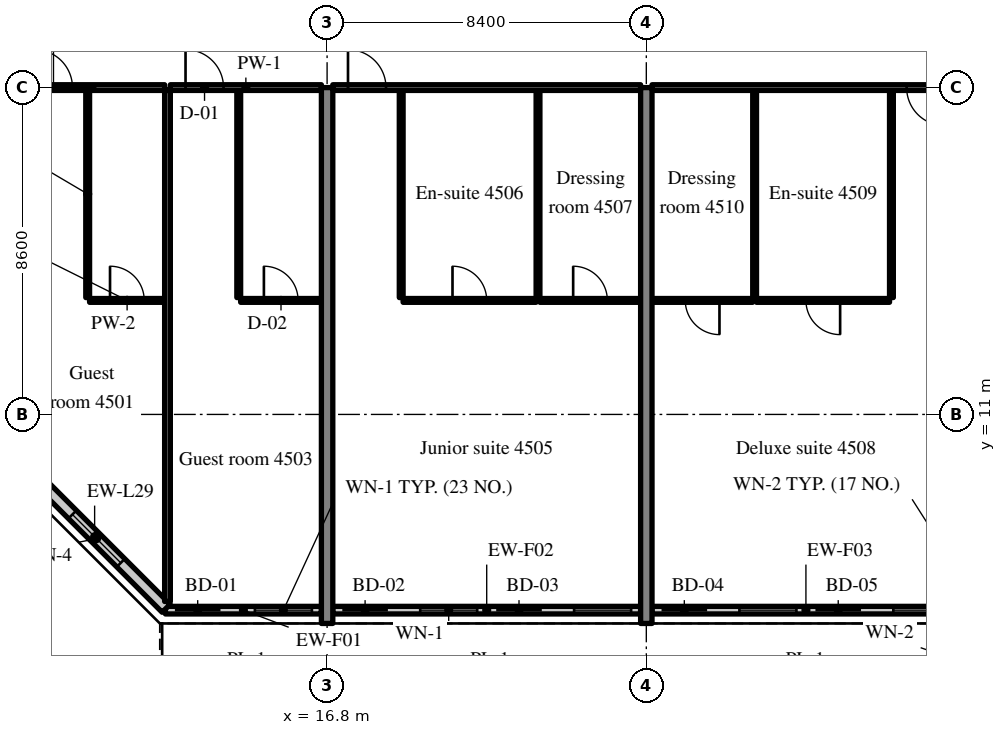
"""IFC4 building model, lengths in metres.
Left out: names, types, materials, properties, quantities, classifications, styles, units other than length and angle.
Written with IfcOpenShell. Run it as: python <this file> out.ifc"""

import sys

from ifc_helpers import new_model, si_unit, direction, frame, frame_2d, origin, place, context, subcontext, project, spatial, rectangle, extrude, source, transform, mapped, element, fill, save


model = new_model("IFC4")
c1 = context("Model", 3, precision=1e-05, world=origin(), true_north=direction((0.0, 1.0)))
c2 = subcontext(c1, "Body", "Model", "MODEL_VIEW")
j1 = project(units=[si_unit("LENGTHUNIT", "METRE"), si_unit("PLANEANGLEUNIT", "RADIAN")], contexts=[c1])
p1 = place(None, origin())
s1 = spatial("IfcSite", under=j1, at=p1, CompositionType="ELEMENT")
p2 = place(p1, origin())
s2 = spatial("IfcBuilding", under=s1, at=p2, CompositionType="ELEMENT")
p3 = place(p2, frame((0.0, 0.0, 185.8)))
s3 = spatial("IfcBuildingStorey", under=s2, at=p3, CompositionType="ELEMENT", Elevation=185.8)
m1 = source(origin(), c2, "Body", "SweptSolid", [
    extrude(rectangle(XDim=14.1, YDim=0.3, at=frame_2d((7.05, 0.0))), origin(), (0.0, 0.0, 1.0), 3.52),
])
for number, where, z_axis, x_axis in (
    (1, (16.8, 5.5, 0.0), (0.0, 0.0, 1.0), (0.0, 1.0, 0.0)),
    (2, (25.2, 5.5, 0.0), (0.0, 0.0, 1.0), (0.0, 1.0, 0.0)),
):
    element("IfcWall", number, at=place(p3, frame(where, z_axis=z_axis, x_axis=x_axis)), inside=s3, PredefinedType="SHEAR", context=c2, shape_type="MappedRepresentation", body=[
        mapped(m1, transform((0.0, 0.0, 0.0), scale=1.0)),
    ])
m2 = source(origin(), c2, "Body", "SweptSolid", [
    extrude(rectangle(XDim=4.105, YDim=0.2, at=frame_2d((2.052, 0.0))), origin(), (0.0, 0.0, 1.0), 2.87),
])
p4 = place(p3, frame((12.545, 5.85, 0.0), z_axis=(0.0, 0.0, 1.0), x_axis=(1.0, 0.0, 0.0)))
e3 = element("IfcWall", 3, at=p4, inside=s3, PredefinedType="SOLIDWALL", context=c2, shape_type="MappedRepresentation", body=[
    mapped(m2, transform((0.0, 0.0, 0.0), scale=1.0)),
])
m3 = source(origin(), c2, "Body", "SweptSolid", [
    extrude(rectangle(XDim=1.2, YDim=2.4, at=frame_2d((0.6, 1.2))), frame((0.0, 0.11, 0.0), z_axis=(0.0, -1.0, 0.0), x_axis=(1.0, 0.0, 0.0)), (0.0, 0.0, 1.0), 0.22),
])
p5 = place(p4, frame((0.25, 0.0, 0.0)))
e4 = element("IfcOpeningElement", 4, at=p5, cuts=e3, PredefinedType="OPENING", context=c2, shape_type="MappedRepresentation", body=[
    mapped(m3, transform((0.0, 0.0, 0.0), scale=1.0)),
])
m4 = source(origin(), c2, "Body", "SweptSolid", [
    extrude(rectangle(XDim=1.5, YDim=1.5, at=frame_2d((0.75, 0.75))), frame((0.0, 0.11, 0.0), z_axis=(0.0, -1.0, 0.0), x_axis=(1.0, 0.0, 0.0)), (0.0, 0.0, 1.0), 0.22),
])
p6 = place(p4, frame((2.355, 0.0, 0.9)))
e5 = element("IfcOpeningElement", 5, at=p6, cuts=e3, PredefinedType="OPENING", context=c2, shape_type="MappedRepresentation", body=[
    mapped(m4, transform((0.0, 0.0, 0.0), scale=1.0)),
])
m5 = source(origin(), c2, "Body", "SweptSolid", [
    extrude(rectangle(XDim=8.1, YDim=0.2, at=frame_2d((4.05, 0.0))), origin(), (0.0, 0.0, 1.0), 2.87),
])
p7 = place(p3, frame((16.95, 5.85, 0.0), z_axis=(0.0, 0.0, 1.0), x_axis=(1.0, 0.0, 0.0)))
e6 = element("IfcWall", 6, at=p7, inside=s3, PredefinedType="SOLIDWALL", context=c2, shape_type="MappedRepresentation", body=[
    mapped(m5, transform((0.0, 0.0, 0.0), scale=1.0)),
])
p8 = place(p7, frame((0.25, 0.0, 0.0)))
e7 = element("IfcOpeningElement", 7, at=p8, cuts=e6, PredefinedType="OPENING", context=c2, shape_type="MappedRepresentation", body=[
    mapped(m3, transform((0.0, 0.0, 0.0), scale=1.0)),
])
p9 = place(p7, frame((2.3, 0.0, 0.9)))
e8 = element("IfcOpeningElement", 8, at=p9, cuts=e6, PredefinedType="OPENING", context=c2, shape_type="MappedRepresentation", body=[
    mapped(m4, transform((0.0, 0.0, 0.0), scale=1.0)),
])
p10 = place(p7, frame((4.3, 0.0, 0.0)))
e9 = element("IfcOpeningElement", 9, at=p10, cuts=e6, PredefinedType="OPENING", context=c2, shape_type="MappedRepresentation", body=[
    mapped(m3, transform((0.0, 0.0, 0.0), scale=1.0)),
])
p11 = place(p7, frame((6.35, 0.0, 0.9)))
e10 = element("IfcOpeningElement", 10, at=p11, cuts=e6, PredefinedType="OPENING", context=c2, shape_type="MappedRepresentation", body=[
    mapped(m4, transform((0.0, 0.0, 0.0), scale=1.0)),
])
m6 = source(origin(), c2, "Body", "SweptSolid", [
    extrude(rectangle(XDim=8.1, YDim=0.2, at=frame_2d((4.05, 0.0))), origin(), (0.0, 0.0, 1.0), 2.87),
])
p12 = place(p3, frame((25.35, 5.85, 0.0), z_axis=(0.0, 0.0, 1.0), x_axis=(1.0, 0.0, 0.0)))
e11 = element("IfcWall", 11, at=p12, inside=s3, PredefinedType="SOLIDWALL", context=c2, shape_type="MappedRepresentation", body=[
    mapped(m6, transform((0.0, 0.0, 0.0), scale=1.0)),
])
p13 = place(p12, frame((0.25, 0.0, 0.0)))
e12 = element("IfcOpeningElement", 12, at=p13, cuts=e11, PredefinedType="OPENING", context=c2, shape_type="MappedRepresentation", body=[
    mapped(m3, transform((0.0, 0.0, 0.0), scale=1.0)),
])
p14 = place(p12, frame((2.3, 0.0, 0.9)))
e13 = element("IfcOpeningElement", 13, at=p14, cuts=e11, PredefinedType="OPENING", context=c2, shape_type="MappedRepresentation", body=[
    mapped(m4, transform((0.0, 0.0, 0.0), scale=1.0)),
])
p15 = place(p12, frame((4.3, 0.0, 0.0)))
e14 = element("IfcOpeningElement", 14, at=p15, cuts=e11, PredefinedType="OPENING", context=c2, shape_type="MappedRepresentation", body=[
    mapped(m3, transform((0.0, 0.0, 0.0), scale=1.0)),
])
p16 = place(p12, frame((6.35, 0.0, 0.9)))
e15 = element("IfcOpeningElement", 15, at=p16, cuts=e11, PredefinedType="OPENING", context=c2, shape_type="MappedRepresentation", body=[
    mapped(m4, transform((0.0, 0.0, 0.0), scale=1.0)),
])
m7 = source(origin(), c2, "Body", "SweptSolid", [
    extrude(rectangle(XDim=5.326, YDim=0.3, at=frame_2d((2.663, 0.0))), origin(), (0.0, 0.0, 1.0), 3.52),
])
p17 = place(p3, frame((8.8, 9.666, 0.0), z_axis=(0.0, 0.0, 1.0), x_axis=(0.707083859269, -0.707129702361, 0.0)))
e16 = element("IfcWall", 16, at=p17, inside=s3, PredefinedType="SOLIDWALL", context=c2, shape_type="MappedRepresentation", body=[
    mapped(m7, transform((0.0, 0.0, 0.0), scale=1.0)),
])
m8 = source(origin(), c2, "Body", "SweptSolid", [
    extrude(rectangle(XDim=1.8, YDim=1.5, at=frame_2d((0.9, 0.75))), frame((0.0, 0.16, 0.0), z_axis=(0.0, -1.0, 0.0), x_axis=(1.0, 0.0, 0.0)), (0.0, 0.0, 1.0), 0.32),
])
p18 = place(p17, frame((1.836, 0.0, 0.9)))
e17 = element("IfcOpeningElement", 17, at=p18, cuts=e16, PredefinedType="OPENING", context=c2, shape_type="MappedRepresentation", body=[
    mapped(m8, transform((0.0, 0.0, 0.0), scale=1.0)),
])
m9 = source(origin(), c2, "Body", "SweptSolid", [
    extrude(rectangle(XDim=5.45, YDim=0.1, at=frame_2d((2.725, 0.0))), origin(), (0.0, 0.0, 1.0), 3.52),
])
p19 = place(p3, frame((10.5, 14.075, 0.0), z_axis=(0.0, 0.0, 1.0), x_axis=(0.0, 1.0, 0.0)))
e18 = element("IfcWall", 18, at=p19, inside=s3, PredefinedType="PARTITIONING", context=c2, shape_type="MappedRepresentation", body=[
    mapped(m9, transform((0.0, 0.0, 0.0), scale=1.0)),
])
m10 = source(origin(), c2, "Body", "SweptSolid", [
    extrude(rectangle(XDim=1.975, YDim=0.1, at=frame_2d((0.987, 0.0))), origin(), (0.0, 0.0, 1.0), 3.52),
])
p20 = place(p3, frame((10.55, 14.0, 0.0), z_axis=(0.0, 0.0, 1.0), x_axis=(1.0, 0.0, 0.0)))
e19 = element("IfcWall", 19, at=p20, inside=s3, PredefinedType="PARTITIONING", context=c2, shape_type="MappedRepresentation", body=[
    mapped(m10, transform((0.0, 0.0, 0.0), scale=1.0)),
])
m11 = source(origin(), c2, "Body", "SweptSolid", [
    extrude(rectangle(XDim=0.9, YDim=2.1, at=frame_2d((0.45, 1.05))), frame((0.0, 0.06, 0.0), z_axis=(0.0, -1.0, 0.0), x_axis=(1.0, 0.0, 0.0)), (0.0, 0.0, 1.0), 0.12),
])
p21 = place(p20, frame((0.538, 0.0, 0.0)))
e20 = element("IfcOpeningElement", 20, at=p21, cuts=e19, PredefinedType="OPENING", context=c2, shape_type="MappedRepresentation", body=[
    mapped(m11, transform((0.0, 0.0, 0.0), scale=1.0)),
])
m12 = source(origin(), c2, "Body", "SweptSolid", [
    extrude(rectangle(XDim=3.825, YDim=0.15, at=frame_2d((1.913, 0.0))), origin(), (0.0, 0.0, 1.0), 2.82),
])
p22 = place(p3, frame((8.7, 19.6, 0.0), z_axis=(0.0, 0.0, 1.0), x_axis=(1.0, 0.0, 0.0)))
e21 = element("IfcWall", 21, at=p22, inside=s3, PredefinedType="PARTITIONING", context=c2, shape_type="MappedRepresentation", body=[
    mapped(m12, transform((0.0, 0.0, 0.0), scale=1.0)),
])
m13 = source(origin(), c2, "Body", "SweptSolid", [
    extrude(rectangle(XDim=1.0, YDim=2.1, at=frame_2d((0.5, 1.05))), frame((0.0, 0.085, 0.0), z_axis=(0.0, -1.0, 0.0), x_axis=(1.0, 0.0, 0.0)), (0.0, 0.0, 1.0), 0.17),
])
p23 = place(p22, frame((0.4, 0.0, 0.0)))
e22 = element("IfcOpeningElement", 22, at=p23, cuts=e21, PredefinedType="OPENING", context=c2, shape_type="MappedRepresentation", body=[
    mapped(m13, transform((0.0, 0.0, 0.0), scale=1.0)),
])
p24 = place(p3, frame((14.475, 14.075, 0.0), z_axis=(0.0, 0.0, 1.0), x_axis=(0.0, 1.0, 0.0)))
e23 = element("IfcWall", 23, at=p24, inside=s3, PredefinedType="PARTITIONING", context=c2, shape_type="MappedRepresentation", body=[
    mapped(m9, transform((0.0, 0.0, 0.0), scale=1.0)),
])
m14 = source(origin(), c2, "Body", "SweptSolid", [
    extrude(rectangle(XDim=2.125, YDim=0.1, at=frame_2d((1.062, 0.0))), origin(), (0.0, 0.0, 1.0), 3.52),
])
p25 = place(p3, frame((14.525, 14.0, 0.0), z_axis=(0.0, 0.0, 1.0), x_axis=(1.0, 0.0, 0.0)))
e24 = element("IfcWall", 24, at=p25, inside=s3, PredefinedType="PARTITIONING", context=c2, shape_type="MappedRepresentation", body=[
    mapped(m14, transform((0.0, 0.0, 0.0), scale=1.0)),
])
p26 = place(p25, frame((0.612, 0.0, 0.0)))
e25 = element("IfcOpeningElement", 25, at=p26, cuts=e24, PredefinedType="OPENING", context=c2, shape_type="MappedRepresentation", body=[
    mapped(m11, transform((0.0, 0.0, 0.0), scale=1.0)),
])
m15 = source(origin(), c2, "Body", "SweptSolid", [
    extrude(rectangle(XDim=3.975, YDim=0.15, at=frame_2d((1.987, 0.0))), origin(), (0.0, 0.0, 1.0), 2.82),
])
p27 = place(p3, frame((12.675, 19.6, 0.0), z_axis=(0.0, 0.0, 1.0), x_axis=(1.0, 0.0, 0.0)))
e26 = element("IfcWall", 26, at=p27, inside=s3, PredefinedType="PARTITIONING", context=c2, shape_type="MappedRepresentation", body=[
    mapped(m15, transform((0.0, 0.0, 0.0), scale=1.0)),
])
p28 = place(p27, frame((0.4, 0.0, 0.0)))
e27 = element("IfcOpeningElement", 27, at=p28, cuts=e26, PredefinedType="OPENING", context=c2, shape_type="MappedRepresentation", body=[
    mapped(m13, transform((0.0, 0.0, 0.0), scale=1.0)),
])
m16 = source(origin(), c2, "Body", "SweptSolid", [
    extrude(rectangle(XDim=13.447, YDim=0.15, at=frame_2d((6.724, 0.0))), origin(), (0.0, 0.0, 1.0), 3.52),
])
p29 = place(p3, frame((12.6, 6.078, 0.0), z_axis=(0.0, 0.0, 1.0), x_axis=(0.0, 1.0, 0.0)))
e28 = element("IfcWall", 28, at=p29, inside=s3, PredefinedType="PARTITIONING", context=c2, shape_type="MappedRepresentation", body=[
    mapped(m16, transform((0.0, 0.0, 0.0), scale=1.0)),
])
for number, where, z_axis, x_axis in (
    (29, (18.75, 14.075, 0.0), (0.0, 0.0, 1.0), (0.0, 1.0, 0.0)),
    (30, (22.35, 14.075, 0.0), (0.0, 0.0, 1.0), (0.0, 1.0, 0.0)),
):
    element("IfcWall", number, at=place(p3, frame(where, z_axis=z_axis, x_axis=x_axis)), inside=s3, PredefinedType="PARTITIONING", context=c2, shape_type="MappedRepresentation", body=[
        mapped(m9, transform((0.0, 0.0, 0.0), scale=1.0)),
    ])
m17 = source(origin(), c2, "Body", "SweptSolid", [
    extrude(rectangle(XDim=3.5, YDim=0.1, at=frame_2d((1.75, 0.0))), origin(), (0.0, 0.0, 1.0), 3.52),
])
p30 = place(p3, frame((18.8, 14.0, 0.0), z_axis=(0.0, 0.0, 1.0), x_axis=(1.0, 0.0, 0.0)))
e31 = element("IfcWall", 31, at=p30, inside=s3, PredefinedType="PARTITIONING", context=c2, shape_type="MappedRepresentation", body=[
    mapped(m17, transform((0.0, 0.0, 0.0), scale=1.0)),
])
p31 = place(p30, frame((1.3, 0.0, 0.0)))
e32 = element("IfcOpeningElement", 32, at=p31, cuts=e31, PredefinedType="OPENING", context=c2, shape_type="MappedRepresentation", body=[
    mapped(m11, transform((0.0, 0.0, 0.0), scale=1.0)),
])
m18 = source(origin(), c2, "Body", "SweptSolid", [
    extrude(rectangle(XDim=2.65, YDim=0.1, at=frame_2d((1.325, 0.0))), origin(), (0.0, 0.0, 1.0), 3.52),
])
p32 = place(p3, frame((22.4, 14.0, 0.0), z_axis=(0.0, 0.0, 1.0), x_axis=(1.0, 0.0, 0.0)))
e33 = element("IfcWall", 33, at=p32, inside=s3, PredefinedType="PARTITIONING", context=c2, shape_type="MappedRepresentation", body=[
    mapped(m18, transform((0.0, 0.0, 0.0), scale=1.0)),
])
p33 = place(p32, frame((0.875, 0.0, 0.0)))
e34 = element("IfcOpeningElement", 34, at=p33, cuts=e33, PredefinedType="OPENING", context=c2, shape_type="MappedRepresentation", body=[
    mapped(m11, transform((0.0, 0.0, 0.0), scale=1.0)),
])
m19 = source(origin(), c2, "Body", "SweptSolid", [
    extrude(rectangle(XDim=8.1, YDim=0.15, at=frame_2d((4.05, 0.0))), origin(), (0.0, 0.0, 1.0), 2.82),
])
p34 = place(p3, frame((16.95, 19.6, 0.0), z_axis=(0.0, 0.0, 1.0), x_axis=(1.0, 0.0, 0.0)))
e35 = element("IfcWall", 35, at=p34, inside=s3, PredefinedType="PARTITIONING", context=c2, shape_type="MappedRepresentation", body=[
    mapped(m19, transform((0.0, 0.0, 0.0), scale=1.0)),
])
p35 = place(p34, frame((0.4, 0.0, 0.0)))
e36 = element("IfcOpeningElement", 36, at=p35, cuts=e35, PredefinedType="OPENING", context=c2, shape_type="MappedRepresentation", body=[
    mapped(m13, transform((0.0, 0.0, 0.0), scale=1.0)),
])
for number, where, z_axis, x_axis in (
    (37, (31.65, 14.075, 0.0), (0.0, 0.0, 1.0), (0.0, 1.0, 0.0)),
    (38, (28.05, 14.075, 0.0), (0.0, 0.0, 1.0), (0.0, 1.0, 0.0)),
):
    element("IfcWall", number, at=place(p3, frame(where, z_axis=z_axis, x_axis=x_axis)), inside=s3, PredefinedType="PARTITIONING", context=c2, shape_type="MappedRepresentation", body=[
        mapped(m9, transform((0.0, 0.0, 0.0), scale=1.0)),
    ])
p36 = place(p3, frame((28.1, 14.0, 0.0), z_axis=(0.0, 0.0, 1.0), x_axis=(1.0, 0.0, 0.0)))
e39 = element("IfcWall", 39, at=p36, inside=s3, PredefinedType="PARTITIONING", context=c2, shape_type="MappedRepresentation", body=[
    mapped(m17, transform((0.0, 0.0, 0.0), scale=1.0)),
])
p37 = place(p36, frame((1.3, 0.0, 0.0)))
e40 = element("IfcOpeningElement", 40, at=p37, cuts=e39, PredefinedType="OPENING", context=c2, shape_type="MappedRepresentation", body=[
    mapped(m11, transform((0.0, 0.0, 0.0), scale=1.0)),
])
m20 = source(origin(), c2, "Body", "SweptSolid", [
    extrude(rectangle(XDim=2.65, YDim=0.1, at=frame_2d((1.325, 0.0))), origin(), (0.0, 0.0, 1.0), 3.52),
])
p38 = place(p3, frame((25.35, 14.0, 0.0), z_axis=(0.0, 0.0, 1.0), x_axis=(1.0, 0.0, 0.0)))
e41 = element("IfcWall", 41, at=p38, inside=s3, PredefinedType="PARTITIONING", context=c2, shape_type="MappedRepresentation", body=[
    mapped(m20, transform((0.0, 0.0, 0.0), scale=1.0)),
])
p39 = place(p38, frame((0.875, 0.0, 0.0)))
e42 = element("IfcOpeningElement", 42, at=p39, cuts=e41, PredefinedType="OPENING", context=c2, shape_type="MappedRepresentation", body=[
    mapped(m11, transform((0.0, 0.0, 0.0), scale=1.0)),
])
m21 = source(origin(), c2, "Body", "SweptSolid", [
    extrude(rectangle(XDim=8.1, YDim=0.15, at=frame_2d((4.05, 0.0))), origin(), (0.0, 0.0, 1.0), 2.82),
])
p40 = place(p3, frame((25.35, 19.6, 0.0), z_axis=(0.0, 0.0, 1.0), x_axis=(1.0, 0.0, 0.0)))
e43 = element("IfcWall", 43, at=p40, inside=s3, PredefinedType="PARTITIONING", context=c2, shape_type="MappedRepresentation", body=[
    mapped(m21, transform((0.0, 0.0, 0.0), scale=1.0)),
])
p41 = place(p40, frame((6.7, 0.0, 0.0)))
e44 = element("IfcOpeningElement", 44, at=p41, cuts=e43, PredefinedType="OPENING", context=c2, shape_type="MappedRepresentation", body=[
    mapped(m13, transform((0.0, 0.0, 0.0), scale=1.0)),
])
m22 = source(origin(), c2, "Body", "SweptSolid", [
    extrude(rectangle(XDim=1.2, YDim=2.4, at=frame_2d((0.6, 1.2))), frame((0.0, 0.025, 0.0), z_axis=(0.0, -1.0, 0.0), x_axis=(1.0, 0.0, 0.0)), (0.0, 0.0, 1.0), 0.05),
])
p42 = place(p5, origin())
e45 = element("IfcDoor", 45, at=p42, inside=s3, OperationType="SLIDING_TO_LEFT", PredefinedType="DOOR", context=c2, shape_type="MappedRepresentation", body=[
    mapped(m22, transform((0.0, 0.0, 0.0), scale=1.0)),
])
fill(e4, e45)
m23 = source(origin(), c2, "Body", "SweptSolid", [
    extrude(rectangle(XDim=1.5, YDim=1.5, at=frame_2d((0.75, 0.75))), frame((0.0, 0.03, 0.0), z_axis=(0.0, -1.0, 0.0), x_axis=(1.0, 0.0, 0.0)), (0.0, 0.0, 1.0), 0.06),
])
p43 = place(p6, origin())
e46 = element("IfcWindow", 46, at=p43, inside=s3, PartitioningType="SINGLE_PANEL", PredefinedType="WINDOW", context=c2, shape_type="MappedRepresentation", body=[
    mapped(m23, transform((0.0, 0.0, 0.0), scale=1.0)),
])
fill(e5, e46)
p44 = place(p8, origin())
e47 = element("IfcDoor", 47, at=p44, inside=s3, OperationType="SLIDING_TO_RIGHT", PredefinedType="DOOR", context=c2, shape_type="MappedRepresentation", body=[
    mapped(m22, transform((0.0, 0.0, 0.0), scale=1.0)),
])
fill(e7, e47)
p45 = place(p9, origin())
e48 = element("IfcWindow", 48, at=p45, inside=s3, PartitioningType="SINGLE_PANEL", PredefinedType="WINDOW", context=c2, shape_type="MappedRepresentation", body=[
    mapped(m23, transform((0.0, 0.0, 0.0), scale=1.0)),
])
fill(e8, e48)
p46 = place(p10, origin())
e49 = element("IfcDoor", 49, at=p46, inside=s3, OperationType="SLIDING_TO_LEFT", PredefinedType="DOOR", context=c2, shape_type="MappedRepresentation", body=[
    mapped(m22, transform((0.0, 0.0, 0.0), scale=1.0)),
])
fill(e9, e49)
p47 = place(p11, origin())
e50 = element("IfcWindow", 50, at=p47, inside=s3, PartitioningType="SINGLE_PANEL", PredefinedType="WINDOW", context=c2, shape_type="MappedRepresentation", body=[
    mapped(m23, transform((0.0, 0.0, 0.0), scale=1.0)),
])
fill(e10, e50)
p48 = place(p13, origin())
e51 = element("IfcDoor", 51, at=p48, inside=s3, OperationType="SLIDING_TO_RIGHT", PredefinedType="DOOR", context=c2, shape_type="MappedRepresentation", body=[
    mapped(m22, transform((0.0, 0.0, 0.0), scale=1.0)),
])
fill(e12, e51)
p49 = place(p14, origin())
e52 = element("IfcWindow", 52, at=p49, inside=s3, PartitioningType="SINGLE_PANEL", PredefinedType="WINDOW", context=c2, shape_type="MappedRepresentation", body=[
    mapped(m23, transform((0.0, 0.0, 0.0), scale=1.0)),
])
fill(e13, e52)
p50 = place(p15, origin())
e53 = element("IfcDoor", 53, at=p50, inside=s3, OperationType="SLIDING_TO_LEFT", PredefinedType="DOOR", context=c2, shape_type="MappedRepresentation", body=[
    mapped(m22, transform((0.0, 0.0, 0.0), scale=1.0)),
])
fill(e14, e53)
p51 = place(p16, origin())
e54 = element("IfcWindow", 54, at=p51, inside=s3, PartitioningType="SINGLE_PANEL", PredefinedType="WINDOW", context=c2, shape_type="MappedRepresentation", body=[
    mapped(m23, transform((0.0, 0.0, 0.0), scale=1.0)),
])
fill(e15, e54)
m24 = source(origin(), c2, "Body", "SweptSolid", [
    extrude(rectangle(XDim=1.8, YDim=1.5, at=frame_2d((0.9, 0.75))), frame((0.0, 0.03, 0.0), z_axis=(0.0, -1.0, 0.0), x_axis=(1.0, 0.0, 0.0)), (0.0, 0.0, 1.0), 0.06),
])
p52 = place(p18, origin())
e55 = element("IfcWindow", 55, at=p52, inside=s3, PartitioningType="SINGLE_PANEL", PredefinedType="WINDOW", context=c2, shape_type="MappedRepresentation", body=[
    mapped(m24, transform((0.0, 0.0, 0.0), scale=1.0)),
])
fill(e17, e55)
m25 = source(origin(), c2, "Body", "SweptSolid", [
    extrude(rectangle(XDim=0.9, YDim=2.1, at=frame_2d((0.45, 1.05))), frame((0.0, 0.025, 0.0), z_axis=(0.0, -1.0, 0.0), x_axis=(1.0, 0.0, 0.0)), (0.0, 0.0, 1.0), 0.05),
])
p53 = place(p21, origin())
e56 = element("IfcDoor", 56, at=p53, inside=s3, OperationType="SINGLE_SWING_LEFT", PredefinedType="DOOR", context=c2, shape_type="MappedRepresentation", body=[
    mapped(m25, transform((0.0, 0.0, 0.0), scale=1.0)),
])
fill(e20, e56)
m26 = source(origin(), c2, "Body", "SweptSolid", [
    extrude(rectangle(XDim=1.0, YDim=2.1, at=frame_2d((0.5, 1.05))), frame((0.0, 0.025, 0.0), z_axis=(0.0, -1.0, 0.0), x_axis=(1.0, 0.0, 0.0)), (0.0, 0.0, 1.0), 0.05),
])
p54 = place(p23, origin())
e57 = element("IfcDoor", 57, at=p54, inside=s3, OperationType="SINGLE_SWING_LEFT", PredefinedType="DOOR", context=c2, shape_type="MappedRepresentation", body=[
    mapped(m26, transform((0.0, 0.0, 0.0), scale=1.0)),
])
fill(e22, e57)
p55 = place(p26, origin())
e58 = element("IfcDoor", 58, at=p55, inside=s3, OperationType="SINGLE_SWING_LEFT", PredefinedType="DOOR", context=c2, shape_type="MappedRepresentation", body=[
    mapped(m25, transform((0.0, 0.0, 0.0), scale=1.0)),
])
fill(e25, e58)
p56 = place(p28, origin())
e59 = element("IfcDoor", 59, at=p56, inside=s3, OperationType="SINGLE_SWING_LEFT", PredefinedType="DOOR", context=c2, shape_type="MappedRepresentation", body=[
    mapped(m26, transform((0.0, 0.0, 0.0), scale=1.0)),
])
fill(e27, e59)
p57 = place(p31, origin())
e60 = element("IfcDoor", 60, at=p57, inside=s3, OperationType="SINGLE_SWING_LEFT", PredefinedType="DOOR", context=c2, shape_type="MappedRepresentation", body=[
    mapped(m25, transform((0.0, 0.0, 0.0), scale=1.0)),
])
fill(e32, e60)
p58 = place(p33, origin())
e61 = element("IfcDoor", 61, at=p58, inside=s3, OperationType="SINGLE_SWING_LEFT", PredefinedType="DOOR", context=c2, shape_type="MappedRepresentation", body=[
    mapped(m25, transform((0.0, 0.0, 0.0), scale=1.0)),
])
fill(e34, e61)
p59 = place(p35, origin())
e62 = element("IfcDoor", 62, at=p59, inside=s3, OperationType="SINGLE_SWING_LEFT", PredefinedType="DOOR", context=c2, shape_type="MappedRepresentation", body=[
    mapped(m26, transform((0.0, 0.0, 0.0), scale=1.0)),
])
fill(e36, e62)
p60 = place(p37, origin())
e63 = element("IfcDoor", 63, at=p60, inside=s3, OperationType="SINGLE_SWING_RIGHT", PredefinedType="DOOR", context=c2, shape_type="MappedRepresentation", body=[
    mapped(m25, transform((0.0, 0.0, 0.0), scale=1.0)),
])
fill(e40, e63)
p61 = place(p39, origin())
e64 = element("IfcDoor", 64, at=p61, inside=s3, OperationType="SINGLE_SWING_RIGHT", PredefinedType="DOOR", context=c2, shape_type="MappedRepresentation", body=[
    mapped(m25, transform((0.0, 0.0, 0.0), scale=1.0)),
])
fill(e42, e64)
p62 = place(p41, origin())
e65 = element("IfcDoor", 65, at=p62, inside=s3, OperationType="SINGLE_SWING_RIGHT", PredefinedType="DOOR", context=c2, shape_type="MappedRepresentation", body=[
    mapped(m26, transform((0.0, 0.0, 0.0), scale=1.0)),
])
fill(e44, e65)
save(model, sys.argv[1])
